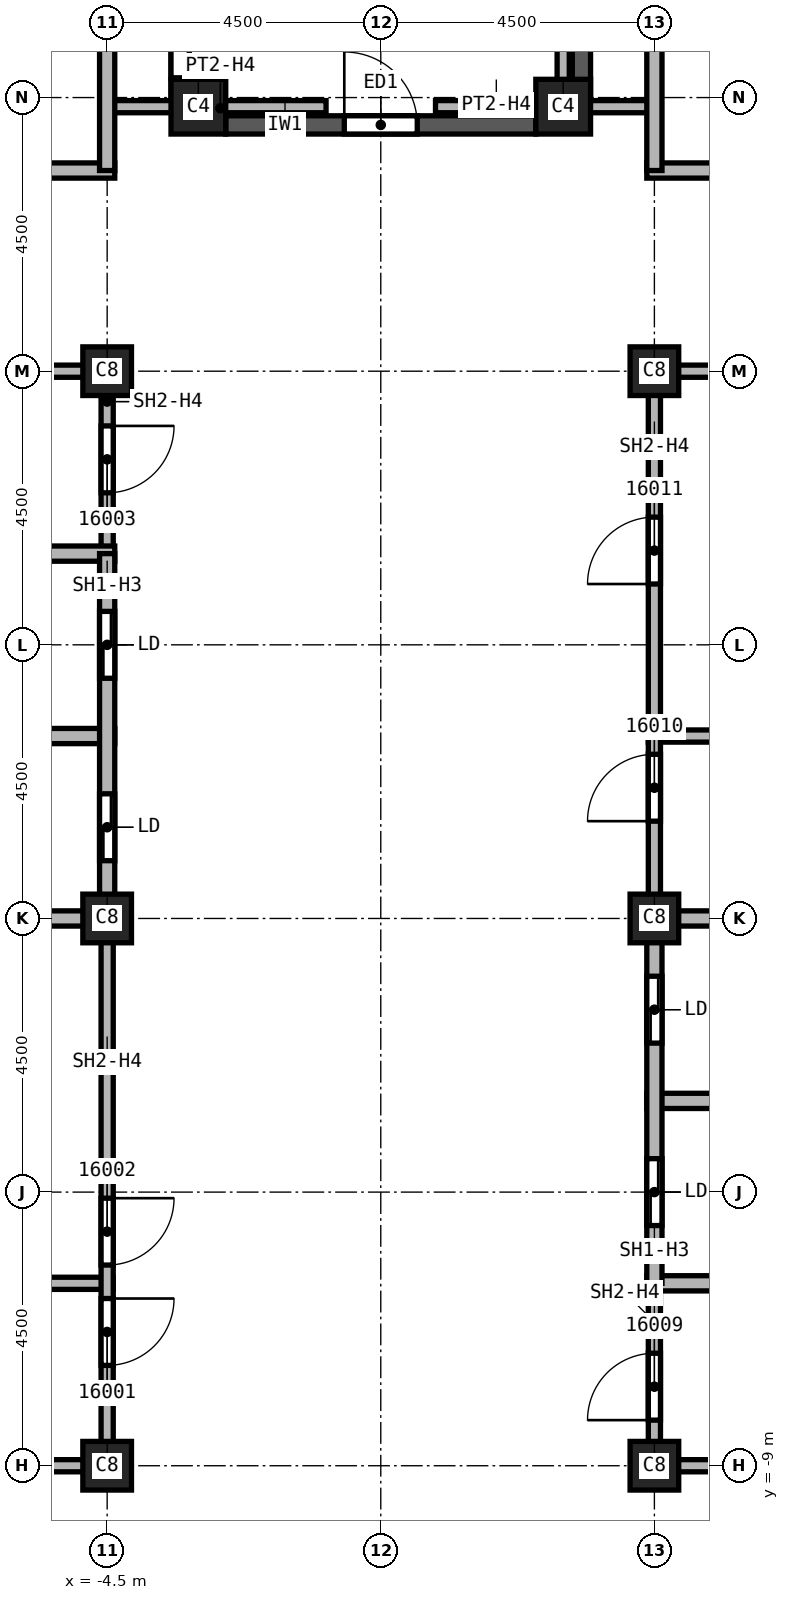
"""IFC4 building model, lengths in metres.
Left out: names, types, materials, properties, quantities, classifications, styles, units other than length and angle.
Written with IfcOpenShell. Run it as: python <this file> out.ifc"""

import sys

from ifc_helpers import new_model, si_unit, direction, frame, frame_2d, origin, origin_2d, place, context, subcontext, project, spatial, rectangle, extrude, element, fill, save


model = new_model("IFC4")
c1 = context("Model", 3, precision=1e-05, world=origin(), true_north=direction((0.0, 1.0)))
c2 = subcontext(c1, "Body", "Model", "MODEL_VIEW")
j1 = project(units=[si_unit("LENGTHUNIT", "METRE"), si_unit("PLANEANGLEUNIT", "RADIAN")], contexts=[c1])
p1 = place(None, origin())
s1 = spatial("IfcSite", under=j1, at=p1, CompositionType="ELEMENT")
p2 = place(p1, origin())
s2 = spatial("IfcBuilding", under=s1, at=p2, CompositionType="ELEMENT")
p3 = place(p2, frame((0.0, 0.0, 242.0)))
s3 = spatial("IfcBuildingStorey", under=s2, at=p3, CompositionType="ELEMENT", Elevation=242.0)
for number, where, z_axis, x_axis in (
    (1, (4.5, 0.0, 0.0), (0.0, 0.0, 1.0), (1.0, 0.0, 0.0)),
    (2, (4.5, 9.0, 0.0), (0.0, 0.0, 1.0), (1.0, 0.0, 0.0)),
    (3, (4.5, -9.0, 0.0), (0.0, 0.0, 1.0), (1.0, 0.0, 0.0)),
    (4, (-4.5, 0.0, 0.0), (0.0, 0.0, 1.0), (1.0, 0.0, 0.0)),
    (5, (-4.5, 9.0, 0.0), (0.0, 0.0, 1.0), (1.0, 0.0, 0.0)),
    (6, (-4.5, -9.0, 0.0), (0.0, 0.0, 1.0), (1.0, 0.0, 0.0)),
):
    element("IfcColumn", number, at=place(p3, frame(where, z_axis=z_axis, x_axis=x_axis)), inside=s3, PredefinedType="COLUMN", context=c2, shape_type="SweptSolid", body=[
        extrude(rectangle(XDim=0.8, YDim=0.8, at=origin_2d()), origin(), (0.0, 0.0, 1.0), 3.72),
    ])
for number, where, z_axis, x_axis in (
    (7, (3.0, 13.35, 0.0), (0.0, 0.0, 1.0), (1.0, 0.0, 0.0)),
    (8, (-3.0, 13.35, 0.0), (0.0, 0.0, 1.0), (1.0, 0.0, 0.0)),
):
    element("IfcColumn", number, at=place(p3, frame(where, z_axis=z_axis, x_axis=x_axis)), inside=s3, PredefinedType="COLUMN", context=c2, shape_type="SweptSolid", body=[
        extrude(rectangle(XDim=0.9, YDim=0.9, at=origin_2d()), origin(), (0.0, 0.0, 1.0), 3.72),
    ])
p4 = place(p3, frame((3.3, 21.9, 0.0), z_axis=(0.0, 0.0, 1.0), x_axis=(0.0, -1.0, 0.0)))
e9 = element("IfcWall", 9, at=p4, inside=s3, PredefinedType="SOLIDWALL", context=c2, shape_type="SweptSolid", body=[
    extrude(rectangle(XDim=8.5, YDim=0.3, at=frame_2d((4.25, 0.0))), origin(), (0.0, 0.0, 1.0), 3.12),
])
p5 = place(p4, frame((0.825, 0.0, 0.8)))
e10 = element("IfcOpeningElement", 10, at=p5, cuts=e9, PredefinedType="OPENING", context=c2, shape_type="SweptSolid", body=[
    extrude(rectangle(XDim=2.4, YDim=1.95, at=frame_2d((1.2, 0.975))), frame((0.0, 0.15, 0.0), z_axis=(0.0, -1.0, 0.0), x_axis=(1.0, 0.0, 0.0)), (0.0, 0.0, 1.0), 0.3),
])
p6 = place(p4, frame((4.875, 0.0, 0.8)))
e11 = element("IfcOpeningElement", 11, at=p6, cuts=e9, PredefinedType="OPENING", context=c2, shape_type="SweptSolid", body=[
    extrude(rectangle(XDim=2.4, YDim=1.95, at=frame_2d((1.2, 0.975))), frame((0.0, 0.15, 0.0), z_axis=(0.0, -1.0, 0.0), x_axis=(1.0, 0.0, 0.0)), (0.0, 0.0, 1.0), 0.3),
])
p7 = place(p3, frame((-2.55, 13.05, 0.0), z_axis=(0.0, 0.0, 1.0), x_axis=(1.0, 0.0, 0.0)))
e12 = element("IfcWall", 12, at=p7, inside=s3, PredefinedType="SOLIDWALL", context=c2, shape_type="SweptSolid", body=[
    extrude(rectangle(XDim=5.1, YDim=0.3, at=frame_2d((2.55, 0.0))), origin(), (0.0, 0.0, 1.0), 3.12),
])
p8 = place(p7, frame((1.95, 0.0, 0.0)))
e13 = element("IfcOpeningElement", 13, at=p8, cuts=e12, PredefinedType="OPENING", context=c2, shape_type="SweptSolid", body=[
    extrude(rectangle(XDim=1.2, YDim=2.4, at=frame_2d((0.6, 1.2))), frame((0.0, 0.15, 0.0), z_axis=(0.0, -1.0, 0.0), x_axis=(1.0, 0.0, 0.0)), (0.0, 0.0, 1.0), 0.3),
])
p9 = place(p3, frame((-3.3, 13.4, 0.0), z_axis=(0.0, 0.0, 1.0), x_axis=(0.0, 1.0, 0.0)))
e14 = element("IfcWall", 14, at=p9, inside=s3, PredefinedType="SOLIDWALL", context=c2, shape_type="SweptSolid", body=[
    extrude(rectangle(XDim=8.5, YDim=0.3, at=frame_2d((4.25, 0.0))), origin(), (0.0, 0.0, 1.0), 3.12),
])
p10 = place(p9, frame((0.425, 0.0, 0.8)))
e15 = element("IfcOpeningElement", 15, at=p10, cuts=e14, PredefinedType="OPENING", context=c2, shape_type="SweptSolid", body=[
    extrude(rectangle(XDim=2.4, YDim=1.95, at=frame_2d((1.2, 0.975))), frame((0.0, 0.15, 0.0), z_axis=(0.0, -1.0, 0.0), x_axis=(1.0, 0.0, 0.0)), (0.0, 0.0, 1.0), 0.3),
])
p11 = place(p9, frame((4.475, 0.0, 0.8)))
e16 = element("IfcOpeningElement", 16, at=p11, cuts=e14, PredefinedType="OPENING", context=c2, shape_type="SweptSolid", body=[
    extrude(rectangle(XDim=2.4, YDim=1.95, at=frame_2d((1.2, 0.975))), frame((0.0, 0.15, 0.0), z_axis=(0.0, -1.0, 0.0), x_axis=(1.0, 0.0, 0.0)), (0.0, 0.0, 1.0), 0.3),
])
for number, where, z_axis, x_axis in (
    (17, (-4.5, 13.35, 0.0), (0.0, 0.0, 1.0), (1.0, 0.0, 0.0)),
    (18, (0.9, 13.35, 0.0), (0.0, 0.0, 1.0), (1.0, 0.0, 0.0)),
):
    element("IfcWall", number, at=place(p3, frame(where, z_axis=z_axis, x_axis=x_axis)), inside=s3, PredefinedType="PARTITIONING", context=c2, shape_type="SweptSolid", body=[
        extrude(rectangle(XDim=3.6, YDim=0.2, at=frame_2d((1.8, 0.0))), origin(), (0.0, 0.0, 1.0), 3.118),
    ])
p12 = place(p3, frame((3.0, 21.9, 0.0), z_axis=(0.0, 0.0, 1.0), x_axis=(0.0, -1.0, 0.0)))
e19 = element("IfcWall", 19, at=p12, inside=s3, PredefinedType="PARTITIONING", context=c2, shape_type="SweptSolid", body=[
    extrude(rectangle(XDim=8.55, YDim=0.2, at=frame_2d((4.275, 0.0))), origin(), (0.0, 0.0, 1.0), 2.874),
])
p13 = place(p3, frame((-7.6, -6.0, 0.0), z_axis=(0.0, 0.0, 1.0), x_axis=(1.0, 0.0, 0.0)))
e20 = element("IfcWall", 20, at=p13, inside=s3, PredefinedType="SOLIDWALL", context=c2, shape_type="SweptSolid", body=[
    extrude(rectangle(XDim=3.2, YDim=0.2, at=frame_2d((1.6, 0.0))), origin(), (0.0, 0.0, 1.0), 3.72),
])
for number, where, z_axis, x_axis in (
    (21, (-7.5, 9.0, 0.0), (0.0, 0.0, 1.0), (1.0, 0.0, 0.0)),
    (22, (-4.5, -9.0, 0.0), (0.0, 0.0, 1.0), (-1.0, 0.0, 0.0)),
):
    element("IfcWall", number, at=place(p3, frame(where, z_axis=z_axis, x_axis=x_axis)), inside=s3, PredefinedType="SOLIDWALL", context=c2, shape_type="SweptSolid", body=[
        extrude(rectangle(XDim=3.0, YDim=0.2, at=frame_2d((1.5, 0.0))), origin(), (0.0, 0.0, 1.0), 3.042),
    ])
p14 = place(p3, frame((-4.5, 0.0, 0.0), z_axis=(0.0, 0.0, 1.0), x_axis=(0.0, -1.0, 0.0)))
e23 = element("IfcWall", 23, at=p14, inside=s3, PredefinedType="SOLIDWALL", context=c2, shape_type="SweptSolid", body=[
    extrude(rectangle(XDim=9.1, YDim=0.2, at=frame_2d((4.55, 0.0))), origin(), (0.0, 0.0, 1.0), 3.042),
])
p15 = place(p14, frame((6.25, 0.0, 0.0)))
e24 = element("IfcOpeningElement", 24, at=p15, cuts=e23, PredefinedType="OPENING", context=c2, shape_type="SweptSolid", body=[
    extrude(rectangle(XDim=1.1, YDim=2.1, at=frame_2d((0.55, 1.05))), frame((0.0, 0.1, 0.0), z_axis=(0.0, -1.0, 0.0), x_axis=(1.0, 0.0, 0.0)), (0.0, 0.0, 1.0), 0.2),
])
p16 = place(p14, frame((4.6, 0.0, 0.0)))
e25 = element("IfcOpeningElement", 25, at=p16, cuts=e23, PredefinedType="OPENING", context=c2, shape_type="SweptSolid", body=[
    extrude(rectangle(XDim=1.1, YDim=2.1, at=frame_2d((0.55, 1.05))), frame((0.0, 0.1, 0.0), z_axis=(0.0, -1.0, 0.0), x_axis=(1.0, 0.0, 0.0)), (0.0, 0.0, 1.0), 0.2),
])
p17 = place(p3, frame((-4.5, 9.1, 0.0), z_axis=(0.0, 0.0, 1.0), x_axis=(0.0, -1.0, 0.0)))
e26 = element("IfcWall", 26, at=p17, inside=s3, PredefinedType="SOLIDWALL", context=c2, shape_type="SweptSolid", body=[
    extrude(rectangle(XDim=3.1, YDim=0.2, at=frame_2d((1.55, 0.0))), origin(), (0.0, 0.0, 1.0), 3.042),
])
p18 = place(p17, frame((1.0, 0.0, 0.0)))
e27 = element("IfcOpeningElement", 27, at=p18, cuts=e26, PredefinedType="OPENING", context=c2, shape_type="SweptSolid", body=[
    extrude(rectangle(XDim=1.1, YDim=2.1, at=frame_2d((0.55, 1.05))), frame((0.0, 0.1, 0.0), z_axis=(0.0, -1.0, 0.0), x_axis=(1.0, 0.0, 0.0)), (0.0, 0.0, 1.0), 0.2),
])
p19 = place(p3, frame((4.4, 3.0, 0.0), z_axis=(0.0, 0.0, 1.0), x_axis=(1.0, 0.0, 0.0)))
e28 = element("IfcWall", 28, at=p19, inside=s3, PredefinedType="SOLIDWALL", context=c2, shape_type="SweptSolid", body=[
    extrude(rectangle(XDim=3.225, YDim=0.2, at=frame_2d((1.613, 0.0))), origin(), (0.0, 0.0, 1.0), 3.72),
])
p20 = place(p3, frame((4.5, -9.1, 0.0), z_axis=(0.0, 0.0, 1.0), x_axis=(0.0, 1.0, 0.0)))
e29 = element("IfcWall", 29, at=p20, inside=s3, PredefinedType="SOLIDWALL", context=c2, shape_type="SweptSolid", body=[
    extrude(rectangle(XDim=3.1, YDim=0.2, at=frame_2d((1.55, 0.0))), origin(), (0.0, 0.0, 1.0), 3.042),
])
p21 = place(p20, frame((0.85, 0.0, 0.0)))
e30 = element("IfcOpeningElement", 30, at=p21, cuts=e29, PredefinedType="OPENING", context=c2, shape_type="SweptSolid", body=[
    extrude(rectangle(XDim=1.1, YDim=2.1, at=frame_2d((0.55, 1.05))), frame((0.0, 0.1, 0.0), z_axis=(0.0, -1.0, 0.0), x_axis=(1.0, 0.0, 0.0)), (0.0, 0.0, 1.0), 0.2),
])
p22 = place(p3, frame((4.5, 0.0, 0.0), z_axis=(0.0, 0.0, 1.0), x_axis=(0.0, 1.0, 0.0)))
e31 = element("IfcWall", 31, at=p22, inside=s3, PredefinedType="SOLIDWALL", context=c2, shape_type="SweptSolid", body=[
    extrude(rectangle(XDim=9.1, YDim=0.2, at=frame_2d((4.55, 0.0))), origin(), (0.0, 0.0, 1.0), 3.042),
])
p23 = place(p22, frame((1.6, 0.0, 0.0)))
e32 = element("IfcOpeningElement", 32, at=p23, cuts=e31, PredefinedType="OPENING", context=c2, shape_type="SweptSolid", body=[
    extrude(rectangle(XDim=1.1, YDim=2.1, at=frame_2d((0.55, 1.05))), frame((0.0, 0.1, 0.0), z_axis=(0.0, -1.0, 0.0), x_axis=(1.0, 0.0, 0.0)), (0.0, 0.0, 1.0), 0.2),
])
p24 = place(p22, frame((5.5, 0.0, 0.0)))
e33 = element("IfcOpeningElement", 33, at=p24, cuts=e31, PredefinedType="OPENING", context=c2, shape_type="SweptSolid", body=[
    extrude(rectangle(XDim=1.1, YDim=2.1, at=frame_2d((0.55, 1.05))), frame((0.0, 0.1, 0.0), z_axis=(0.0, -1.0, 0.0), x_axis=(1.0, 0.0, 0.0)), (0.0, 0.0, 1.0), 0.2),
])
for number, where, z_axis, x_axis in (
    (34, (4.5, 9.0, 0.0), (0.0, 0.0, 1.0), (1.0, 0.0, 0.0)),
    (35, (7.5, -9.0, 0.0), (0.0, 0.0, 1.0), (-1.0, 0.0, 0.0)),
):
    element("IfcWall", number, at=place(p3, frame(where, z_axis=z_axis, x_axis=x_axis)), inside=s3, PredefinedType="SOLIDWALL", context=c2, shape_type="SweptSolid", body=[
        extrude(rectangle(XDim=3.0, YDim=0.2, at=frame_2d((1.5, 0.0))), origin(), (0.0, 0.0, 1.0), 3.042),
    ])
p25 = place(p3, frame((-13.625, 3.0, 0.0), z_axis=(0.0, 0.0, 1.0), x_axis=(1.0, 0.0, 0.0)))
e36 = element("IfcWall", 36, at=p25, inside=s3, PredefinedType="SOLIDWALL", context=c2, shape_type="SweptSolid", body=[
    extrude(rectangle(XDim=9.25, YDim=0.25, at=frame_2d((4.625, 0.0))), origin(), (0.0, 0.0, 1.0), 3.72),
])
p26 = place(p25, frame((3.25, 0.0, 0.0)))
e37 = element("IfcOpeningElement", 37, at=p26, cuts=e36, PredefinedType="OPENING", context=c2, shape_type="SweptSolid", body=[
    extrude(rectangle(XDim=1.1, YDim=2.1, at=frame_2d((0.55, 1.05))), frame((0.0, 0.125, 0.0), z_axis=(0.0, -1.0, 0.0), x_axis=(1.0, 0.0, 0.0)), (0.0, 0.0, 1.0), 0.25),
])
for number, where, z_axis, x_axis in (
    (38, (-7.625, 0.0, 0.0), (0.0, 0.0, 1.0), (1.0, 0.0, 0.0)),
    (39, (-7.625, 6.0, 0.0), (0.0, 0.0, 1.0), (1.0, 0.0, 0.0)),
):
    element("IfcWall", number, at=place(p3, frame(where, z_axis=z_axis, x_axis=x_axis)), inside=s3, PredefinedType="SOLIDWALL", context=c2, shape_type="SweptSolid", body=[
        extrude(rectangle(XDim=3.25, YDim=0.25, at=frame_2d((1.625, 0.0))), origin(), (0.0, 0.0, 1.0), 3.72),
    ])
p27 = place(p3, frame((-4.5, 6.0, 0.0), z_axis=(0.0, 0.0, 1.0), x_axis=(0.0, -1.0, 0.0)))
e40 = element("IfcWall", 40, at=p27, inside=s3, PredefinedType="SOLIDWALL", context=c2, shape_type="SweptSolid", body=[
    extrude(rectangle(XDim=6.0, YDim=0.25, at=frame_2d((3.0, 0.0))), origin(), (0.0, 0.0, 1.0), 3.042),
])
p28 = place(p27, frame((3.95, 0.0, 0.0)))
e41 = element("IfcOpeningElement", 41, at=p28, cuts=e40, PredefinedType="OPENING", context=c2, shape_type="SweptSolid", body=[
    extrude(rectangle(XDim=1.1, YDim=2.1, at=frame_2d((0.55, 1.05))), frame((0.0, 0.125, 0.0), z_axis=(0.0, -1.0, 0.0), x_axis=(1.0, 0.0, 0.0)), (0.0, 0.0, 1.0), 0.25),
])
p29 = place(p27, frame((0.95, 0.0, 0.0)))
e42 = element("IfcOpeningElement", 42, at=p29, cuts=e40, PredefinedType="OPENING", context=c2, shape_type="SweptSolid", body=[
    extrude(rectangle(XDim=1.1, YDim=2.1, at=frame_2d((0.55, 1.05))), frame((0.0, 0.125, 0.0), z_axis=(0.0, -1.0, 0.0), x_axis=(1.0, 0.0, 0.0)), (0.0, 0.0, 1.0), 0.25),
])
p30 = place(p3, frame((4.375, -6.0, 0.0), z_axis=(0.0, 0.0, 1.0), x_axis=(1.0, 0.0, 0.0)))
e43 = element("IfcWall", 43, at=p30, inside=s3, PredefinedType="SOLIDWALL", context=c2, shape_type="SweptSolid", body=[
    extrude(rectangle(XDim=3.25, YDim=0.25, at=frame_2d((1.625, 0.0))), origin(), (0.0, 0.0, 1.0), 3.72),
])
p31 = place(p3, frame((4.375, -3.0, 0.0), z_axis=(0.0, 0.0, 1.0), x_axis=(1.0, 0.0, 0.0)))
e44 = element("IfcWall", 44, at=p31, inside=s3, PredefinedType="SOLIDWALL", context=c2, shape_type="SweptSolid", body=[
    extrude(rectangle(XDim=9.25, YDim=0.25, at=frame_2d((4.625, 0.0))), origin(), (0.0, 0.0, 1.0), 3.72),
])
p32 = place(p31, frame((3.375, 0.0, 0.0)))
e45 = element("IfcOpeningElement", 45, at=p32, cuts=e44, PredefinedType="OPENING", context=c2, shape_type="SweptSolid", body=[
    extrude(rectangle(XDim=1.1, YDim=2.1, at=frame_2d((0.55, 1.05))), frame((0.0, 0.125, 0.0), z_axis=(0.0, -1.0, 0.0), x_axis=(1.0, 0.0, 0.0)), (0.0, 0.0, 1.0), 0.25),
])
p33 = place(p3, frame((4.375, 0.0, 0.0), z_axis=(0.0, 0.0, 1.0), x_axis=(1.0, 0.0, 0.0)))
e46 = element("IfcWall", 46, at=p33, inside=s3, PredefinedType="SOLIDWALL", context=c2, shape_type="SweptSolid", body=[
    extrude(rectangle(XDim=3.25, YDim=0.25, at=frame_2d((1.625, 0.0))), origin(), (0.0, 0.0, 1.0), 3.72),
])
p34 = place(p3, frame((4.5, -6.0, 0.0), z_axis=(0.0, 0.0, 1.0), x_axis=(0.0, 1.0, 0.0)))
e47 = element("IfcWall", 47, at=p34, inside=s3, PredefinedType="SOLIDWALL", context=c2, shape_type="SweptSolid", body=[
    extrude(rectangle(XDim=6.0, YDim=0.25, at=frame_2d((3.0, 0.0))), origin(), (0.0, 0.0, 1.0), 3.042),
])
p35 = place(p34, frame((0.95, 0.0, 0.0)))
e48 = element("IfcOpeningElement", 48, at=p35, cuts=e47, PredefinedType="OPENING", context=c2, shape_type="SweptSolid", body=[
    extrude(rectangle(XDim=1.1, YDim=2.1, at=frame_2d((0.55, 1.05))), frame((0.0, 0.125, 0.0), z_axis=(0.0, -1.0, 0.0), x_axis=(1.0, 0.0, 0.0)), (0.0, 0.0, 1.0), 0.25),
])
p36 = place(p34, frame((3.95, 0.0, 0.0)))
e49 = element("IfcOpeningElement", 49, at=p36, cuts=e47, PredefinedType="OPENING", context=c2, shape_type="SweptSolid", body=[
    extrude(rectangle(XDim=1.1, YDim=2.1, at=frame_2d((0.55, 1.05))), frame((0.0, 0.125, 0.0), z_axis=(0.0, -1.0, 0.0), x_axis=(1.0, 0.0, 0.0)), (0.0, 0.0, 1.0), 0.25),
])
p37 = place(p3, frame((-13.625, 12.3, 0.0), z_axis=(0.0, 0.0, 1.0), x_axis=(1.0, 0.0, 0.0)))
e50 = element("IfcWall", 50, at=p37, inside=s3, PredefinedType="SOLIDWALL", context=c2, shape_type="SweptSolid", body=[
    extrude(rectangle(XDim=9.25, YDim=0.25, at=frame_2d((4.625, 0.0))), origin(), (0.0, 0.0, 1.0), 3.72),
])
p38 = place(p37, frame((0.85, 0.0, 0.0)))
e51 = element("IfcOpeningElement", 51, at=p38, cuts=e50, PredefinedType="OPENING", context=c2, shape_type="SweptSolid", body=[
    extrude(rectangle(XDim=1.2, YDim=2.1, at=frame_2d((0.6, 1.05))), frame((0.0, 0.125, 0.0), z_axis=(0.0, -1.0, 0.0), x_axis=(1.0, 0.0, 0.0)), (0.0, 0.0, 1.0), 0.25),
])
p39 = place(p3, frame((-4.5, 16.8, 0.0), z_axis=(0.0, 0.0, 1.0), x_axis=(0.0, -1.0, 0.0)))
e52 = element("IfcWall", 52, at=p39, inside=s3, PredefinedType="SOLIDWALL", context=c2, shape_type="SweptSolid", body=[
    extrude(rectangle(XDim=4.5, YDim=0.25, at=frame_2d((2.25, 0.0))), origin(), (0.0, 0.0, 1.0), 3.72),
])
p40 = place(p3, frame((4.375, 12.3, 0.0), z_axis=(0.0, 0.0, 1.0), x_axis=(1.0, 0.0, 0.0)))
e53 = element("IfcWall", 53, at=p40, inside=s3, PredefinedType="SOLIDWALL", context=c2, shape_type="SweptSolid", body=[
    extrude(rectangle(XDim=9.25, YDim=0.25, at=frame_2d((4.625, 0.0))), origin(), (0.0, 0.0, 1.0), 3.72),
])
p41 = place(p40, frame((7.2, 0.0, 0.0)))
e54 = element("IfcOpeningElement", 54, at=p41, cuts=e53, PredefinedType="OPENING", context=c2, shape_type="SweptSolid", body=[
    extrude(rectangle(XDim=1.2, YDim=2.1, at=frame_2d((0.6, 1.05))), frame((0.0, 0.125, 0.0), z_axis=(0.0, -1.0, 0.0), x_axis=(1.0, 0.0, 0.0)), (0.0, 0.0, 1.0), 0.25),
])
p42 = place(p3, frame((4.5, 12.3, 0.0), z_axis=(0.0, 0.0, 1.0), x_axis=(0.0, 1.0, 0.0)))
e55 = element("IfcWall", 55, at=p42, inside=s3, PredefinedType="SOLIDWALL", context=c2, shape_type="SweptSolid", body=[
    extrude(rectangle(XDim=4.5, YDim=0.25, at=frame_2d((2.25, 0.0))), origin(), (0.0, 0.0, 1.0), 3.72),
])
p43 = place(p8, origin())
e56 = element("IfcDoor", 56, at=p43, inside=s3, OperationType="SINGLE_SWING_LEFT", PredefinedType="DOOR", context=c2, shape_type="SweptSolid", body=[
    extrude(rectangle(XDim=1.2, YDim=2.4, at=frame_2d((0.6, 1.2))), frame((0.0, 0.025, 0.0), z_axis=(0.0, -1.0, 0.0), x_axis=(1.0, 0.0, 0.0)), (0.0, 0.0, 1.0), 0.05),
])
fill(e13, e56)
p44 = place(p10, origin())
e57 = element("IfcWindow", 57, at=p44, inside=s3, PartitioningType="SINGLE_PANEL", PredefinedType="WINDOW", context=c2, shape_type="SweptSolid", body=[
    extrude(rectangle(XDim=2.4, YDim=1.95, at=frame_2d((1.2, 0.975))), frame((0.0, 0.03, 0.0), z_axis=(0.0, -1.0, 0.0), x_axis=(1.0, 0.0, 0.0)), (0.0, 0.0, 1.0), 0.06),
])
fill(e15, e57)
p45 = place(p15, origin())
e58 = element("IfcDoor", 58, at=p45, inside=s3, OperationType="SINGLE_SWING_RIGHT", PredefinedType="DOOR", context=c2, shape_type="SweptSolid", body=[
    extrude(rectangle(XDim=1.1, YDim=2.1, at=frame_2d((0.55, 1.05))), frame((0.0, 0.025, 0.0), z_axis=(0.0, -1.0, 0.0), x_axis=(1.0, 0.0, 0.0)), (0.0, 0.0, 1.0), 0.05),
])
fill(e24, e58)
p46 = place(p16, origin())
e59 = element("IfcDoor", 59, at=p46, inside=s3, OperationType="SINGLE_SWING_LEFT", PredefinedType="DOOR", context=c2, shape_type="SweptSolid", body=[
    extrude(rectangle(XDim=1.1, YDim=2.1, at=frame_2d((0.55, 1.05))), frame((0.0, 0.025, 0.0), z_axis=(0.0, -1.0, 0.0), x_axis=(1.0, 0.0, 0.0)), (0.0, 0.0, 1.0), 0.05),
])
fill(e25, e59)
p47 = place(p18, origin())
e60 = element("IfcDoor", 60, at=p47, inside=s3, OperationType="SINGLE_SWING_RIGHT", PredefinedType="DOOR", context=c2, shape_type="SweptSolid", body=[
    extrude(rectangle(XDim=1.1, YDim=2.1, at=frame_2d((0.55, 1.05))), frame((0.0, 0.025, 0.0), z_axis=(0.0, -1.0, 0.0), x_axis=(1.0, 0.0, 0.0)), (0.0, 0.0, 1.0), 0.05),
])
fill(e27, e60)
p48 = place(p21, origin())
e61 = element("IfcDoor", 61, at=p48, inside=s3, OperationType="SINGLE_SWING_RIGHT", PredefinedType="DOOR", context=c2, shape_type="SweptSolid", body=[
    extrude(rectangle(XDim=1.1, YDim=2.1, at=frame_2d((0.55, 1.05))), frame((0.0, 0.025, 0.0), z_axis=(0.0, -1.0, 0.0), x_axis=(1.0, 0.0, 0.0)), (0.0, 0.0, 1.0), 0.05),
])
fill(e30, e61)
p49 = place(p23, origin())
e62 = element("IfcDoor", 62, at=p49, inside=s3, OperationType="SINGLE_SWING_LEFT", PredefinedType="DOOR", context=c2, shape_type="SweptSolid", body=[
    extrude(rectangle(XDim=1.1, YDim=2.1, at=frame_2d((0.55, 1.05))), frame((0.0, 0.025, 0.0), z_axis=(0.0, -1.0, 0.0), x_axis=(1.0, 0.0, 0.0)), (0.0, 0.0, 1.0), 0.05),
])
fill(e32, e62)
p50 = place(p24, origin())
e63 = element("IfcDoor", 63, at=p50, inside=s3, OperationType="SINGLE_SWING_RIGHT", PredefinedType="DOOR", context=c2, shape_type="SweptSolid", body=[
    extrude(rectangle(XDim=1.1, YDim=2.1, at=frame_2d((0.55, 1.05))), frame((0.0, 0.025, 0.0), z_axis=(0.0, -1.0, 0.0), x_axis=(1.0, 0.0, 0.0)), (0.0, 0.0, 1.0), 0.05),
])
fill(e33, e63)
p51 = place(p28, origin())
e64 = element("IfcDoor", 64, at=p51, inside=s3, OperationType="SLIDING_TO_LEFT", PredefinedType="DOOR", context=c2, shape_type="SweptSolid", body=[
    extrude(rectangle(XDim=1.1, YDim=2.1, at=frame_2d((0.55, 1.05))), frame((0.0, 0.025, 0.0), z_axis=(0.0, -1.0, 0.0), x_axis=(1.0, 0.0, 0.0)), (0.0, 0.0, 1.0), 0.05),
])
fill(e41, e64)
p52 = place(p29, origin())
e65 = element("IfcDoor", 65, at=p52, inside=s3, OperationType="SLIDING_TO_LEFT", PredefinedType="DOOR", context=c2, shape_type="SweptSolid", body=[
    extrude(rectangle(XDim=1.1, YDim=2.1, at=frame_2d((0.55, 1.05))), frame((0.0, 0.025, 0.0), z_axis=(0.0, -1.0, 0.0), x_axis=(1.0, 0.0, 0.0)), (0.0, 0.0, 1.0), 0.05),
])
fill(e42, e65)
p53 = place(p35, origin())
e66 = element("IfcDoor", 66, at=p53, inside=s3, OperationType="SLIDING_TO_LEFT", PredefinedType="DOOR", context=c2, shape_type="SweptSolid", body=[
    extrude(rectangle(XDim=1.1, YDim=2.1, at=frame_2d((0.55, 1.05))), frame((0.0, 0.025, 0.0), z_axis=(0.0, -1.0, 0.0), x_axis=(1.0, 0.0, 0.0)), (0.0, 0.0, 1.0), 0.05),
])
fill(e48, e66)
p54 = place(p36, origin())
e67 = element("IfcDoor", 67, at=p54, inside=s3, OperationType="SLIDING_TO_LEFT", PredefinedType="DOOR", context=c2, shape_type="SweptSolid", body=[
    extrude(rectangle(XDim=1.1, YDim=2.1, at=frame_2d((0.55, 1.05))), frame((0.0, 0.025, 0.0), z_axis=(0.0, -1.0, 0.0), x_axis=(1.0, 0.0, 0.0)), (0.0, 0.0, 1.0), 0.05),
])
fill(e49, e67)
save(model, sys.argv[1])
